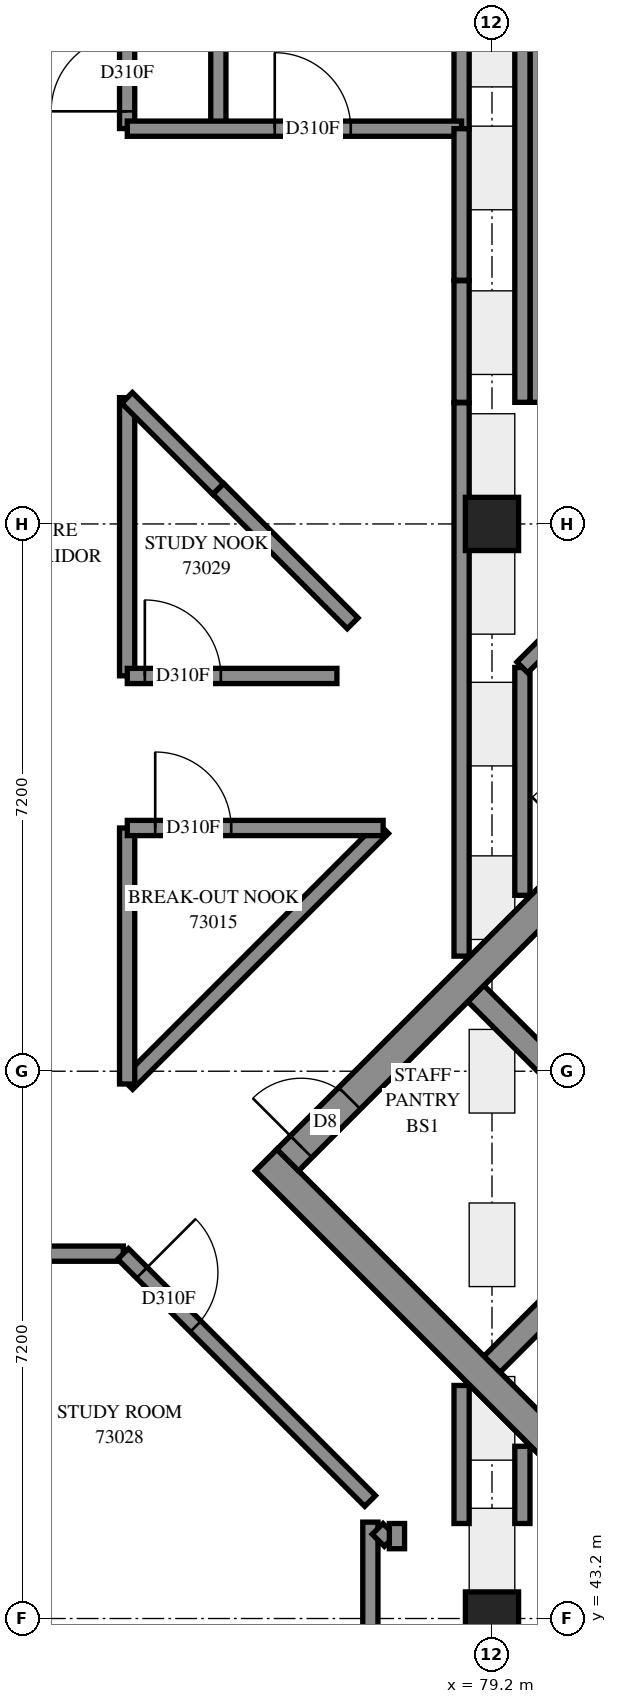
"""IFC4 building model, lengths in metres.
Left out: names, types, materials, properties, quantities, classifications, styles, units other than length and angle.
Written with IfcOpenShell. Run it as: python <this file> out.ifc"""

import sys

from ifc_helpers import new_model, si_unit, direction, frame, frame_2d, origin, origin_2d, place, context, subcontext, project, spatial, rectangle, extrude, element, fill, save


model = new_model("IFC4")
c1 = context("Model", 3, precision=1e-05, world=origin(), true_north=direction((0.0, 1.0)))
c2 = subcontext(c1, "Body", "Model", "MODEL_VIEW")
j1 = project(units=[si_unit("LENGTHUNIT", "METRE"), si_unit("PLANEANGLEUNIT", "RADIAN")], contexts=[c1])
p1 = place(None, origin())
s1 = spatial("IfcSite", under=j1, at=p1, CompositionType="ELEMENT")
p2 = place(p1, origin())
s2 = spatial("IfcBuilding", under=s1, at=p2, CompositionType="ELEMENT")
p3 = place(p2, frame((0.0, 0.0, 267.6)))
s3 = spatial("IfcBuildingStorey", under=s2, at=p3, CompositionType="ELEMENT", Elevation=267.6)
for number, where, z_axis, x_axis in (
    (1, (79.2, 43.2, 0.0), (0.0, 0.0, 1.0), (1.0, 0.0, 0.0)),
    (2, (79.2, 57.6, 0.0), (0.0, 0.0, 1.0), (1.0, 0.0, 0.0)),
):
    element("IfcColumn", number, at=place(p3, frame(where, z_axis=z_axis, x_axis=x_axis)), inside=s3, PredefinedType="COLUMN", context=c2, shape_type="SweptSolid", body=[
        extrude(rectangle(XDim=0.7, YDim=0.7, at=origin_2d()), origin(), (0.0, 0.0, 1.0), 3.1),
    ])
p4 = place(p3, frame((76.23, 49.231, -0.3), z_axis=(0.0, 0.0, 1.0), x_axis=(0.7071034917, -0.7071100706, 0.0)))
e3 = element("IfcWall", 3, at=p4, inside=s3, PredefinedType="SHEAR", context=c2, shape_type="SweptSolid", body=[
    extrude(rectangle(XDim=15.2, YDim=0.4, at=frame_2d((7.6, 0.0))), origin(), (0.0, 0.0, 1.0), 2.7),
])
p5 = place(p3, frame((76.513, 49.231, -0.3), z_axis=(0.0, 0.0, 1.0), x_axis=(0.7071067812, 0.7071067812, 0.0)))
e4 = element("IfcWall", 4, at=p5, inside=s3, PredefinedType="SHEAR", context=c2, shape_type="SweptSolid", body=[
    extrude(rectangle(XDim=14.4, YDim=0.4, at=frame_2d((7.2, 0.0))), origin(), (0.0, 0.0, 1.0), 2.7),
])
p6 = place(p5, frame((5.65, 0.0, 0.3)))
e5 = element("IfcOpeningElement", 5, at=p6, cuts=e4, PredefinedType="OPENING", context=c2, shape_type="SweptSolid", body=[
    extrude(rectangle(XDim=1.1, YDim=2.1, at=frame_2d((0.55, 1.05))), frame((0.0, 0.21, 0.0), z_axis=(0.0, -1.0, 0.0), x_axis=(1.0, 0.0, 0.0)), (0.0, 0.0, 1.0), 0.42),
])
p7 = place(p5, frame((11.35, 0.0, 0.3)))
e6 = element("IfcOpeningElement", 6, at=p7, cuts=e4, PredefinedType="OPENING", context=c2, shape_type="SweptSolid", body=[
    extrude(rectangle(XDim=1.1, YDim=2.1, at=frame_2d((0.55, 1.05))), frame((0.0, 0.21, 0.0), z_axis=(0.0, -1.0, 0.0), x_axis=(1.0, 0.0, 0.0)), (0.0, 0.0, 1.0), 0.42),
])
p8 = place(p5, frame((0.25, 0.0, 0.0)))
e7 = element("IfcOpeningElement", 7, at=p8, cuts=e4, PredefinedType="OPENING", context=c2, shape_type="SweptSolid", body=[
    extrude(rectangle(XDim=0.9, YDim=2.1, at=frame_2d((0.45, 1.05))), frame((0.0, 0.21, 0.0), z_axis=(0.0, -1.0, 0.0), x_axis=(1.0, 0.0, 0.0)), (0.0, 0.0, 1.0), 0.42),
])
p9 = place(p3, frame((79.2, 46.544, 0.0), z_axis=(0.0, 0.0, 1.0), x_axis=(0.7071219326, 0.7070916295, 0.0)))
e8 = element("IfcWall", 8, at=p9, inside=s3, PredefinedType="SOLIDWALL", context=c2, shape_type="SweptSolid", body=[
    extrude(rectangle(XDim=3.3, YDim=0.3, at=frame_2d((1.65, 0.0))), origin(), (0.0, 0.0, 1.0), 3.1),
])
p10 = place(p3, frame((78.988, 51.423, 0.0), z_axis=(0.0, 0.0, 1.0), x_axis=(0.7071067812, -0.7071067812, 0.0)))
e9 = element("IfcWall", 9, at=p10, inside=s3, PredefinedType="SOLIDWALL", context=c2, shape_type="SweptSolid", body=[
    extrude(rectangle(XDim=14.4, YDim=0.3, at=frame_2d((7.2, 0.0))), origin(), (0.0, 0.0, 1.0), 3.1),
])
p11 = place(p10, frame((4.95, 0.0, 0.0)))
e10 = element("IfcOpeningElement", 10, at=p11, cuts=e9, PredefinedType="OPENING", context=c2, shape_type="SweptSolid", body=[
    extrude(rectangle(XDim=0.9, YDim=2.1, at=frame_2d((0.45, 1.05))), frame((0.0, 0.16, 0.0), z_axis=(0.0, -1.0, 0.0), x_axis=(1.0, 0.0, 0.0)), (0.0, 0.0, 1.0), 0.32),
])
p12 = place(p10, frame((8.55, 0.0, 0.0)))
e11 = element("IfcOpeningElement", 11, at=p12, cuts=e9, PredefinedType="OPENING", context=c2, shape_type="SweptSolid", body=[
    extrude(rectangle(XDim=0.9, YDim=2.1, at=frame_2d((0.45, 1.05))), frame((0.0, 0.16, 0.0), z_axis=(0.0, -1.0, 0.0), x_axis=(1.0, 0.0, 0.0)), (0.0, 0.0, 1.0), 0.32),
])
p13 = place(p10, frame((12.05, 0.0, 0.0)))
e12 = element("IfcOpeningElement", 12, at=p13, cuts=e9, PredefinedType="OPENING", context=c2, shape_type="SweptSolid", body=[
    extrude(rectangle(XDim=1.1, YDim=2.1, at=frame_2d((0.55, 1.05))), frame((0.0, 0.16, 0.0), z_axis=(0.0, -1.0, 0.0), x_axis=(1.0, 0.0, 0.0)), (0.0, 0.0, 1.0), 0.32),
])
p14 = place(p3, frame((55.2, 48.0, 0.0), z_axis=(0.0, 0.0, 1.0), x_axis=(1.0, 0.0, 0.0)))
e13 = element("IfcWall", 13, at=p14, inside=s3, PredefinedType="PARTITIONING", context=c2, shape_type="SweptSolid", body=[
    extrude(rectangle(XDim=19.15, YDim=0.2, at=frame_2d((9.575, 0.0))), origin(), (0.0, 0.0, 1.0), 3.1),
])
p15 = place(p14, frame((4.475, 0.0, 0.0)))
e14 = element("IfcOpeningElement", 14, at=p15, cuts=e13, PredefinedType="OPENING", context=c2, shape_type="SweptSolid", body=[
    extrude(rectangle(XDim=1.0, YDim=2.1, at=frame_2d((0.5, 1.05))), frame((0.0, 0.11, 0.0), z_axis=(0.0, -1.0, 0.0), x_axis=(1.0, 0.0, 0.0)), (0.0, 0.0, 1.0), 0.22),
])
p16 = place(p14, frame((8.301, 0.0, 0.0)))
e15 = element("IfcOpeningElement", 15, at=p16, cuts=e13, PredefinedType="OPENING", context=c2, shape_type="SweptSolid", body=[
    extrude(rectangle(XDim=0.9, YDim=2.1, at=frame_2d((0.45, 1.05))), frame((0.0, 0.11, 0.0), z_axis=(0.0, -1.0, 0.0), x_axis=(1.0, 0.0, 0.0)), (0.0, 0.0, 1.0), 0.22),
])
p17 = place(p14, frame((13.707, 0.0, 0.0)))
e16 = element("IfcOpeningElement", 16, at=p17, cuts=e13, PredefinedType="OPENING", context=c2, shape_type="SweptSolid", body=[
    extrude(rectangle(XDim=1.0, YDim=2.1, at=frame_2d((0.5, 1.05))), frame((0.0, 0.11, 0.0), z_axis=(0.0, -1.0, 0.0), x_axis=(1.0, 0.0, 0.0)), (0.0, 0.0, 1.0), 0.22),
])
p18 = place(p3, frame((79.8, 59.2, 0.0), z_axis=(0.0, 0.0, 1.0), x_axis=(0.0, 1.0, 0.0)))
e17 = element("IfcWall", 17, at=p18, inside=s3, PredefinedType="PARTITIONING", context=c2, shape_type="SweptSolid", body=[
    extrude(rectangle(XDim=13.8, YDim=0.2, at=frame_2d((6.9, 0.0))), origin(), (0.0, 0.0, 1.0), 3.1),
])
p19 = place(p3, frame((79.6, 59.2, 0.0), z_axis=(0.0, 0.0, 1.0), x_axis=(0.0, 1.0, 0.0)))
e18 = element("IfcWall", 18, at=p19, inside=s3, PredefinedType="PARTITIONING", context=c2, shape_type="SweptSolid", body=[
    extrude(rectangle(XDim=12.8, YDim=0.2, at=frame_2d((6.4, 0.0))), origin(), (0.0, 0.0, 1.0), 3.1),
])
p20 = place(p3, frame((75.6, 62.8, 0.0), z_axis=(0.0, 0.0, 1.0), x_axis=(0.0, 1.0, 0.0)))
e19 = element("IfcWall", 19, at=p20, inside=s3, PredefinedType="PARTITIONING", context=c2, shape_type="SweptSolid", body=[
    extrude(rectangle(XDim=10.043, YDim=0.2, at=frame_2d((5.021, 0.0))), origin(), (0.0, 0.0, 1.0), 3.1),
])
p21 = place(p3, frame((78.8, 62.8, 0.0), z_axis=(0.0, 0.0, 1.0), x_axis=(0.0, 1.0, 0.0)))
e20 = element("IfcWall", 20, at=p21, inside=s3, PredefinedType="PARTITIONING", context=c2, shape_type="SweptSolid", body=[
    extrude(rectangle(XDim=9.2, YDim=0.2, at=frame_2d((4.6, 0.0))), origin(), (0.0, 0.0, 1.0), 3.1),
])
p22 = place(p3, frame((78.8, 51.914, 0.0), z_axis=(0.0, 0.0, 1.0), x_axis=(0.0, 1.0, 0.0)))
e21 = element("IfcWall", 21, at=p22, inside=s3, PredefinedType="PARTITIONING", context=c2, shape_type="SweptSolid", body=[
    extrude(rectangle(XDim=7.28, YDim=0.2, at=frame_2d((3.64, 0.0))), origin(), (0.0, 0.0, 1.0), 3.1),
])
p23 = place(p3, frame((74.401, 50.233, 0.0), z_axis=(0.0, 0.0, 1.0), x_axis=(0.7071067812, 0.7071067812, 0.0)))
e22 = element("IfcWall", 22, at=p23, inside=s3, PredefinedType="PARTITIONING", context=c2, shape_type="SweptSolid", body=[
    extrude(rectangle(XDim=4.76, YDim=0.2, at=frame_2d((2.38, 0.0))), origin(), (0.0, 0.0, 1.0), 3.1),
])
p24 = place(p3, frame((74.347, 47.997, 0.0), z_axis=(0.0, 0.0, 1.0), x_axis=(0.7071067812, -0.7071067812, 0.0)))
e23 = element("IfcWall", 23, at=p24, inside=s3, PredefinedType="PARTITIONING", context=c2, shape_type="SweptSolid", body=[
    extrude(rectangle(XDim=4.596, YDim=0.2, at=frame_2d((2.298, 0.0))), origin(), (0.0, 0.0, 1.0), 3.1),
])
p25 = place(p24, frame((0.35, 0.0, 0.0)))
e24 = element("IfcOpeningElement", 24, at=p25, cuts=e23, PredefinedType="OPENING", context=c2, shape_type="SweptSolid", body=[
    extrude(rectangle(XDim=1.0, YDim=2.1, at=frame_2d((0.5, 1.05))), frame((0.0, 0.11, 0.0), z_axis=(0.0, -1.0, 0.0), x_axis=(1.0, 0.0, 0.0)), (0.0, 0.0, 1.0), 0.22),
])
p26 = place(p3, frame((74.4, 62.802, 0.0), z_axis=(0.0, 0.0, 1.0), x_axis=(0.0, 1.0, 0.0)))
e25 = element("IfcWall", 25, at=p26, inside=s3, PredefinedType="PARTITIONING", context=c2, shape_type="SweptSolid", body=[
    extrude(rectangle(XDim=4.398, YDim=0.2, at=frame_2d((2.199, 0.0))), origin(), (0.0, 0.0, 1.0), 3.1),
])
p27 = place(p26, frame((0.227, 0.0, 0.0)))
e26 = element("IfcOpeningElement", 26, at=p27, cuts=e25, PredefinedType="OPENING", context=c2, shape_type="SweptSolid", body=[
    extrude(rectangle(XDim=1.0, YDim=2.1, at=frame_2d((0.5, 1.05))), frame((0.0, 0.11, 0.0), z_axis=(0.0, -1.0, 0.0), x_axis=(1.0, 0.0, 0.0)), (0.0, 0.0, 1.0), 0.22),
])
p28 = place(p3, frame((74.402, 62.8, 0.0), z_axis=(0.0, 0.0, 1.0), x_axis=(1.0, 0.0, 0.0)))
e27 = element("IfcWall", 27, at=p28, inside=s3, PredefinedType="PARTITIONING", context=c2, shape_type="SweptSolid", body=[
    extrude(rectangle(XDim=4.398, YDim=0.2, at=frame_2d((2.199, 0.0))), origin(), (0.0, 0.0, 1.0), 3.1),
])
p29 = place(p28, frame((1.94, 0.0, 0.0)))
e28 = element("IfcOpeningElement", 28, at=p29, cuts=e27, PredefinedType="OPENING", context=c2, shape_type="SweptSolid", body=[
    extrude(rectangle(XDim=1.0, YDim=2.1, at=frame_2d((0.5, 1.05))), frame((0.0, 0.11, 0.0), z_axis=(0.0, -1.0, 0.0), x_axis=(1.0, 0.0, 0.0)), (0.0, 0.0, 1.0), 0.22),
])
p30 = place(p3, frame((74.4, 55.602, 0.0), z_axis=(0.0, 0.0, 1.0), x_axis=(0.0, 1.0, 0.0)))
e29 = element("IfcWall", 29, at=p30, inside=s3, PredefinedType="PARTITIONING", context=c2, shape_type="SweptSolid", body=[
    extrude(rectangle(XDim=3.66, YDim=0.2, at=frame_2d((1.83, 0.0))), origin(), (0.0, 0.0, 1.0), 3.1),
])
p31 = place(p3, frame((74.4, 50.232, 0.0), z_axis=(0.0, 0.0, 1.0), x_axis=(0.0, 1.0, 0.0)))
e30 = element("IfcWall", 30, at=p31, inside=s3, PredefinedType="PARTITIONING", context=c2, shape_type="SweptSolid", body=[
    extrude(rectangle(XDim=3.368, YDim=0.2, at=frame_2d((1.684, 0.0))), origin(), (0.0, 0.0, 1.0), 3.1),
])
p32 = place(p3, frame((74.402, 53.6, 0.0), z_axis=(0.0, 0.0, 1.0), x_axis=(1.0, 0.0, 0.0)))
e31 = element("IfcWall", 31, at=p32, inside=s3, PredefinedType="PARTITIONING", context=c2, shape_type="SweptSolid", body=[
    extrude(rectangle(XDim=3.366, YDim=0.2, at=frame_2d((1.683, 0.0))), origin(), (0.0, 0.0, 1.0), 3.1),
])
p33 = place(p32, frame((0.367, 0.0, 0.0)))
e32 = element("IfcOpeningElement", 32, at=p33, cuts=e31, PredefinedType="OPENING", context=c2, shape_type="SweptSolid", body=[
    extrude(rectangle(XDim=1.0, YDim=2.1, at=frame_2d((0.5, 1.05))), frame((0.0, 0.11, 0.0), z_axis=(0.0, -1.0, 0.0), x_axis=(1.0, 0.0, 0.0)), (0.0, 0.0, 1.0), 0.22),
])
p34 = place(p3, frame((79.6, 52.714, 0.0), z_axis=(0.0, 0.0, 1.0), x_axis=(0.0, 1.0, 0.0)))
e33 = element("IfcWall", 33, at=p34, inside=s3, PredefinedType="PARTITIONING", context=c2, shape_type="SweptSolid", body=[
    extrude(rectangle(XDim=2.998, YDim=0.2, at=frame_2d((1.499, 0.0))), origin(), (0.0, 0.0, 1.0), 3.1),
])
p35 = place(p3, frame((77.6, 41.503, 0.0), z_axis=(0.0, 0.0, 1.0), x_axis=(0.0, 1.0, 0.0)))
e34 = element("IfcWall", 34, at=p35, inside=s3, PredefinedType="PARTITIONING", context=c2, shape_type="SweptSolid", body=[
    extrude(rectangle(XDim=2.965, YDim=0.2, at=frame_2d((1.482, 0.0))), origin(), (0.0, 0.0, 1.0), 3.1),
])
p36 = place(p3, frame((74.402, 55.6, 0.0), z_axis=(0.0, 0.0, 1.0), x_axis=(1.0, 0.0, 0.0)))
e35 = element("IfcWall", 35, at=p36, inside=s3, PredefinedType="PARTITIONING", context=c2, shape_type="SweptSolid", body=[
    extrude(rectangle(XDim=2.758, YDim=0.2, at=frame_2d((1.379, 0.0))), origin(), (0.0, 0.0, 1.0), 3.1),
])
p37 = place(p36, frame((0.231, 0.0, 0.0)))
e36 = element("IfcOpeningElement", 36, at=p37, cuts=e35, PredefinedType="OPENING", context=c2, shape_type="SweptSolid", body=[
    extrude(rectangle(XDim=1.0, YDim=2.1, at=frame_2d((0.5, 1.05))), frame((0.0, 0.11, 0.0), z_axis=(0.0, -1.0, 0.0), x_axis=(1.0, 0.0, 0.0)), (0.0, 0.0, 1.0), 0.22),
])
p38 = place(p3, frame((75.599, 58.063, 0.0), z_axis=(0.0, 0.0, 1.0), x_axis=(0.7067069471, -0.7075063893, 0.0)))
e37 = element("IfcWall", 37, at=p38, inside=s3, PredefinedType="PARTITIONING", context=c2, shape_type="SweptSolid", body=[
    extrude(rectangle(XDim=2.502, YDim=0.2, at=frame_2d((1.251, 0.0))), origin(), (0.0, 0.0, 1.0), 3.1),
])
p39 = place(p3, frame((78.8, 60.806, 0.0), z_axis=(0.0, 0.0, 1.0), x_axis=(0.0, 1.0, 0.0)))
e38 = element("IfcWall", 38, at=p39, inside=s3, PredefinedType="PARTITIONING", context=c2, shape_type="SweptSolid", body=[
    extrude(rectangle(XDim=1.994, YDim=0.2, at=frame_2d((0.997, 0.0))), origin(), (0.0, 0.0, 1.0), 3.1),
])
p40 = place(p3, frame((78.8, 44.45, 0.0), z_axis=(0.0, 0.0, 1.0), x_axis=(0.0, 1.0, 0.0)))
e39 = element("IfcWall", 39, at=p40, inside=s3, PredefinedType="PARTITIONING", context=c2, shape_type="SweptSolid", body=[
    extrude(rectangle(XDim=1.816, YDim=0.2, at=frame_2d((0.908, 0.0))), origin(), (0.0, 0.0, 1.0), 3.1),
])
p41 = place(p3, frame((79.599, 55.713, 0.0), z_axis=(0.0, 0.0, 1.0), x_axis=(0.7071067812, 0.7071067812, 0.0)))
e40 = element("IfcWall", 40, at=p41, inside=s3, PredefinedType="PARTITIONING", context=c2, shape_type="SweptSolid", body=[
    extrude(rectangle(XDim=1.697, YDim=0.2, at=frame_2d((0.849, 0.0))), origin(), (0.0, 0.0, 1.0), 3.1),
])
p42 = place(p3, frame((74.399, 59.259, 0.0), z_axis=(0.0, 0.0, 1.0), x_axis=(0.7071067812, -0.7071067812, 0.0)))
e41 = element("IfcWall", 41, at=p42, inside=s3, PredefinedType="PARTITIONING", context=c2, shape_type="SweptSolid", body=[
    extrude(rectangle(XDim=1.694, YDim=0.2, at=frame_2d((0.847, 0.0))), origin(), (0.0, 0.0, 1.0), 3.1),
])
p43 = place(p3, frame((78.8, 59.2, 0.0), z_axis=(0.0, 0.0, 1.0), x_axis=(0.0, 1.0, 0.0)))
e42 = element("IfcWall", 42, at=p43, inside=s3, PredefinedType="PARTITIONING", context=c2, shape_type="SweptSolid", body=[
    extrude(rectangle(XDim=1.6, YDim=0.2, at=frame_2d((0.8, 0.0))), origin(), (0.0, 0.0, 1.0), 3.1),
])
p44 = place(p3, frame((79.6, 44.45, 0.0), z_axis=(0.0, 0.0, 1.0), x_axis=(0.0, 1.0, 0.0)))
e43 = element("IfcWall", 43, at=p44, inside=s3, PredefinedType="PARTITIONING", context=c2, shape_type="SweptSolid", body=[
    extrude(rectangle(XDim=1.016, YDim=0.2, at=frame_2d((0.508, 0.0))), origin(), (0.0, 0.0, 1.0), 3.1),
])
p45 = place(p3, frame((77.695, 44.38, 0.0), z_axis=(0.0, 0.0, 1.0), x_axis=(0.707329037, -0.7068844555, 0.0)))
e44 = element("IfcWall", 44, at=p45, inside=s3, PredefinedType="PARTITIONING", context=c2, shape_type="SweptSolid", body=[
    extrude(rectangle(XDim=0.225, YDim=0.2, at=frame_2d((0.112, 0.0))), origin(), (0.0, 0.0, 1.0), 3.1),
])
p46 = place(p3, frame((77.95, 44.118, 0.0), z_axis=(0.0, 0.0, 1.0), x_axis=(0.0, 1.0, 0.0)))
e45 = element("IfcWall", 45, at=p46, inside=s3, PredefinedType="PARTITIONING", context=c2, shape_type="SweptSolid", body=[
    extrude(rectangle(XDim=0.332, YDim=0.2, at=frame_2d((0.166, 0.0))), origin(), (0.0, 0.0, 1.0), 3.1),
])
p47 = place(p8, origin())
e46 = element("IfcDoor", 46, at=p47, inside=s3, OperationType="SINGLE_SWING_LEFT", PredefinedType="DOOR", context=c2, shape_type="SweptSolid", body=[
    extrude(rectangle(XDim=0.9, YDim=2.1, at=frame_2d((0.45, 1.05))), frame((0.0, 0.025, 0.0), z_axis=(0.0, -1.0, 0.0), x_axis=(1.0, 0.0, 0.0)), (0.0, 0.0, 1.0), 0.05),
])
fill(e7, e46)
p48 = place(p33, origin())
e47 = element("IfcDoor", 47, at=p48, inside=s3, OperationType="SINGLE_SWING_RIGHT", PredefinedType="DOOR", context=c2, shape_type="SweptSolid", body=[
    extrude(rectangle(XDim=1.0, YDim=2.1, at=frame_2d((0.5, 1.05))), frame((0.0, 0.025, 0.0), z_axis=(0.0, -1.0, 0.0), x_axis=(1.0, 0.0, 0.0)), (0.0, 0.0, 1.0), 0.05),
])
fill(e32, e47)
p49 = place(p25, origin())
e48 = element("IfcDoor", 48, at=p49, inside=s3, OperationType="SINGLE_SWING_LEFT", PredefinedType="DOOR", context=c2, shape_type="SweptSolid", body=[
    extrude(rectangle(XDim=1.0, YDim=2.1, at=frame_2d((0.5, 1.05))), frame((0.0, 0.025, 0.0), z_axis=(0.0, -1.0, 0.0), x_axis=(1.0, 0.0, 0.0)), (0.0, 0.0, 1.0), 0.05),
])
fill(e24, e48)
p50 = place(p37, origin())
e49 = element("IfcDoor", 49, at=p50, inside=s3, OperationType="SINGLE_SWING_LEFT", PredefinedType="DOOR", context=c2, shape_type="SweptSolid", body=[
    extrude(rectangle(XDim=1.0, YDim=2.1, at=frame_2d((0.5, 1.05))), frame((0.0, 0.025, 0.0), z_axis=(0.0, -1.0, 0.0), x_axis=(1.0, 0.0, 0.0)), (0.0, 0.0, 1.0), 0.05),
])
fill(e36, e49)
p51 = place(p27, origin())
e50 = element("IfcDoor", 50, at=p51, inside=s3, OperationType="SINGLE_SWING_RIGHT", PredefinedType="DOOR", context=c2, shape_type="SweptSolid", body=[
    extrude(rectangle(XDim=1.0, YDim=2.1, at=frame_2d((0.5, 1.05))), frame((0.0, 0.025, 0.0), z_axis=(0.0, -1.0, 0.0), x_axis=(1.0, 0.0, 0.0)), (0.0, 0.0, 1.0), 0.05),
])
fill(e26, e50)
p52 = place(p29, origin())
e51 = element("IfcDoor", 51, at=p52, inside=s3, OperationType="SINGLE_SWING_LEFT", PredefinedType="DOOR", context=c2, shape_type="SweptSolid", body=[
    extrude(rectangle(XDim=1.0, YDim=2.1, at=frame_2d((0.5, 1.05))), frame((0.0, 0.025, 0.0), z_axis=(0.0, -1.0, 0.0), x_axis=(1.0, 0.0, 0.0)), (0.0, 0.0, 1.0), 0.05),
])
fill(e28, e51)
save(model, sys.argv[1])
